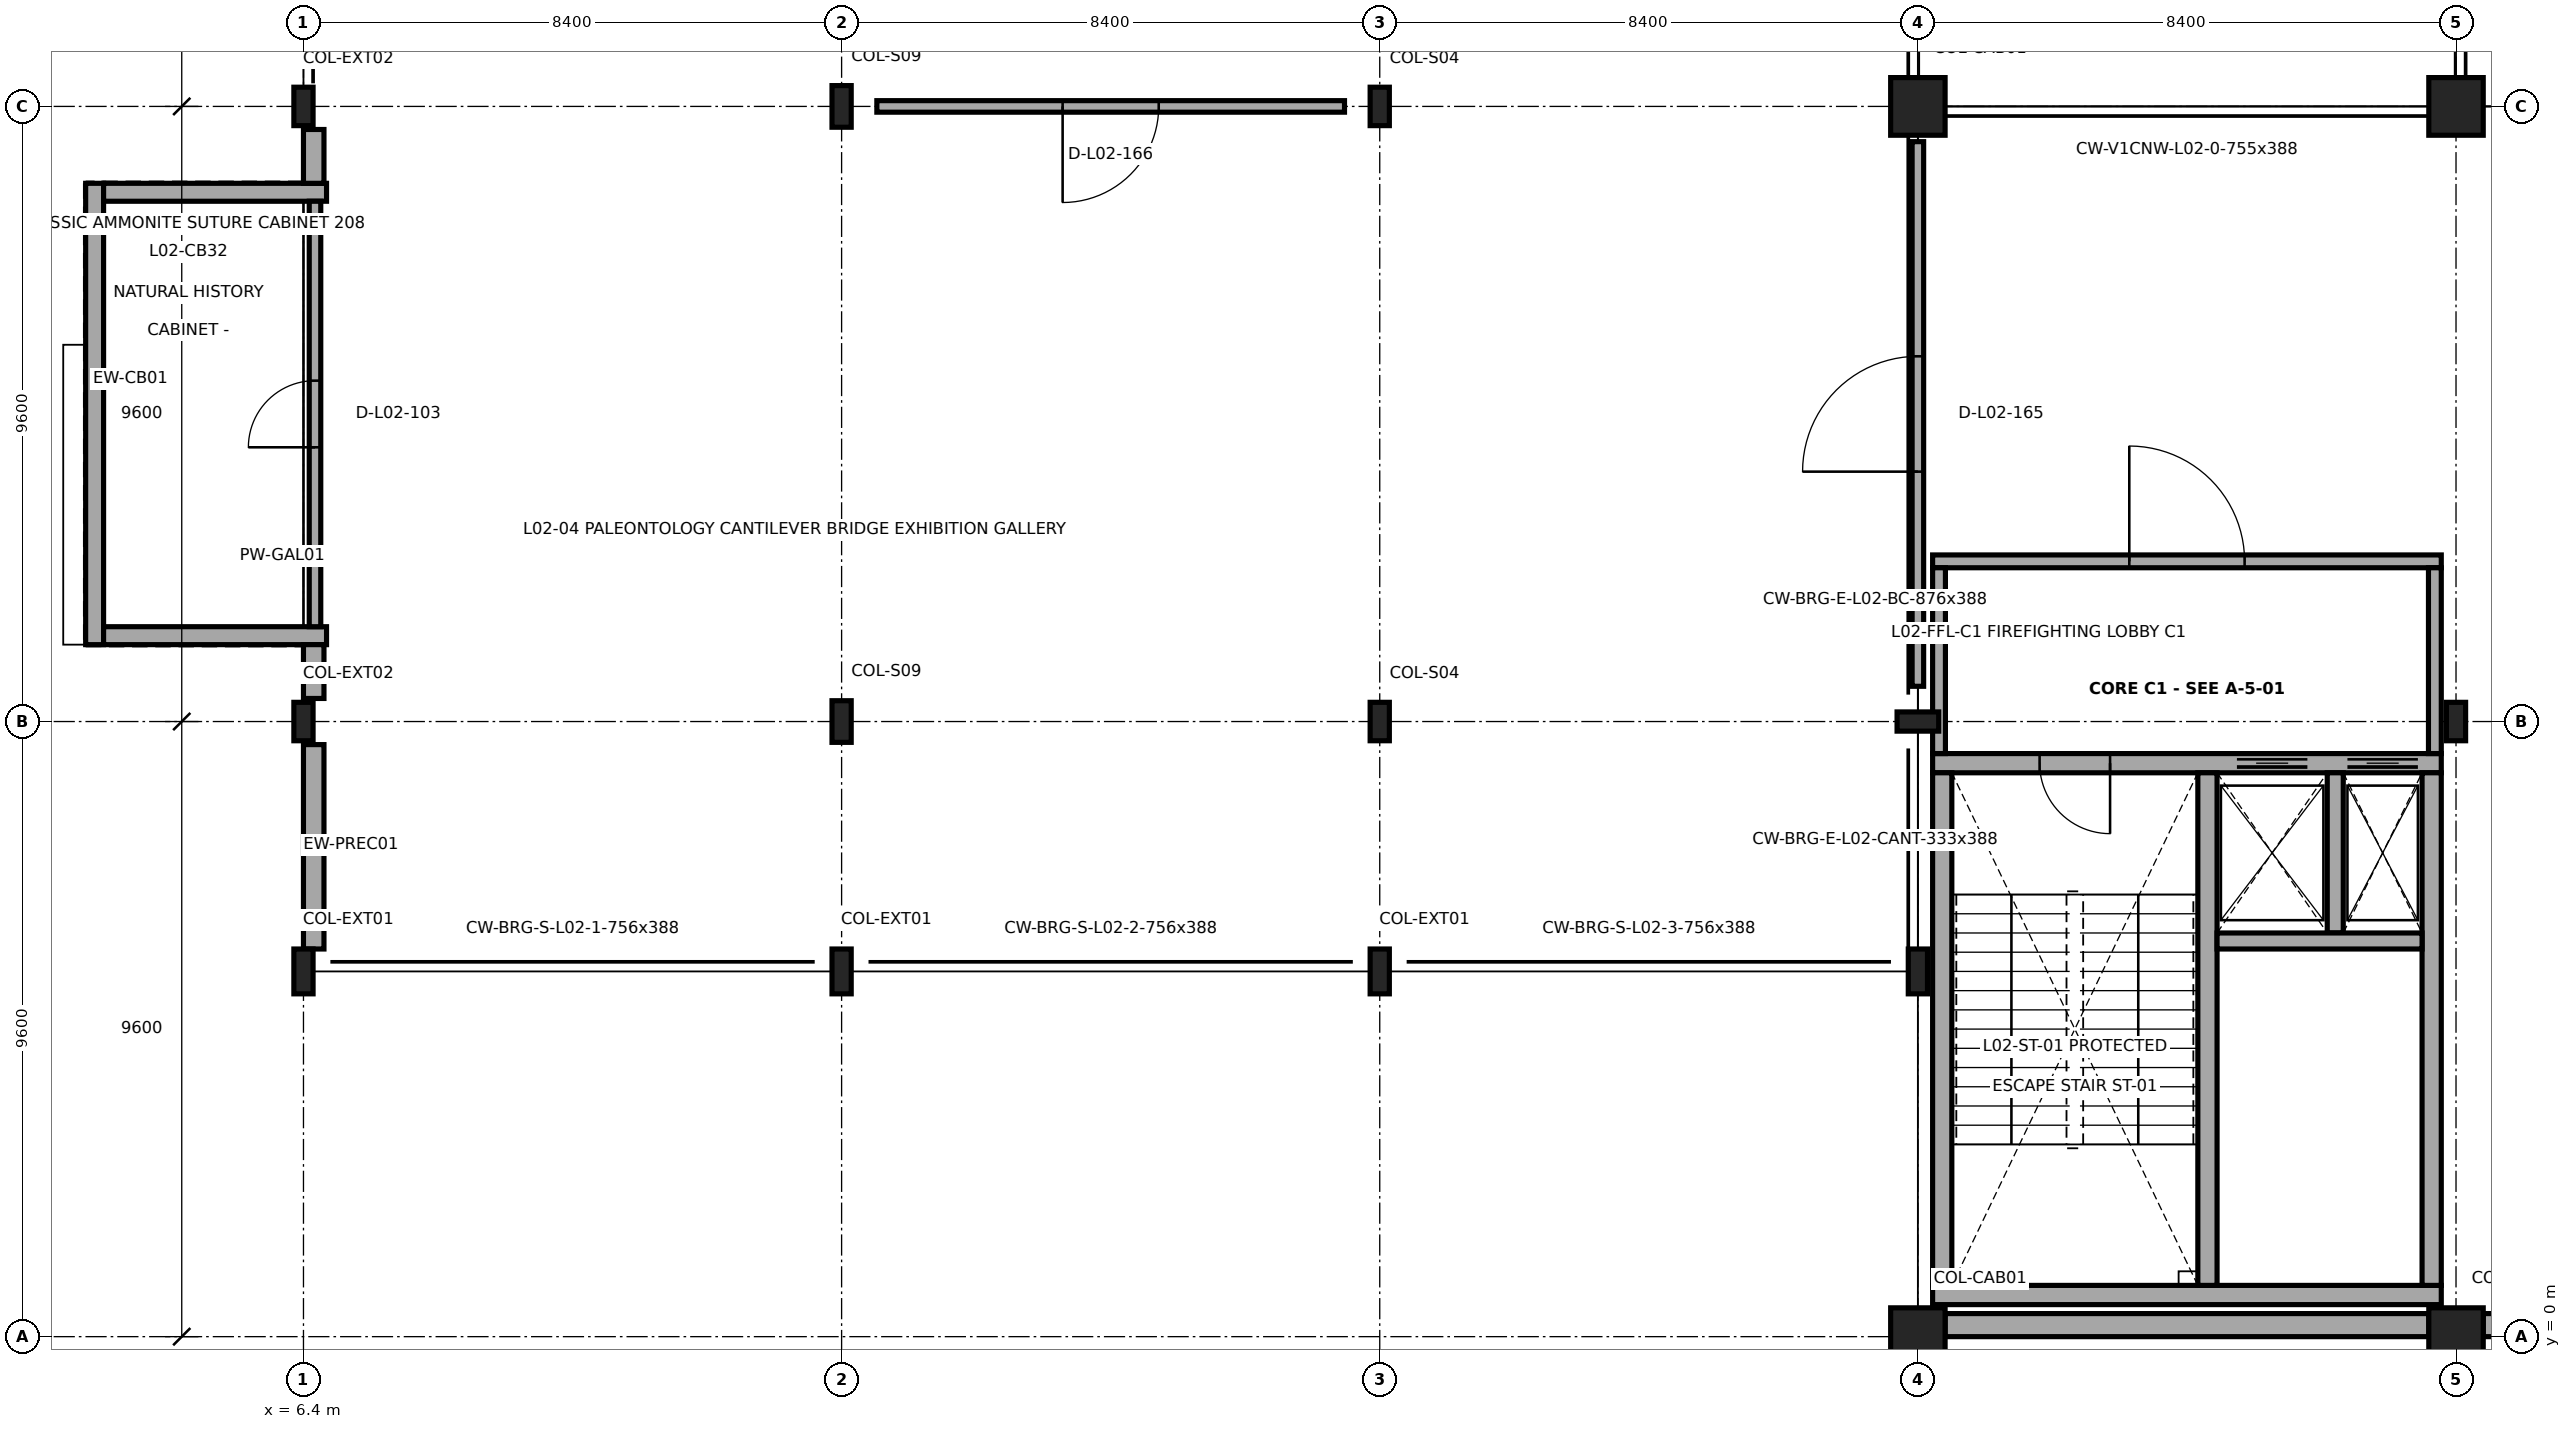
"""IFC4 building model, lengths in metres.
Left out: names, types, materials, properties, quantities, classifications, styles, units other than length and angle.
Written with IfcOpenShell. Run it as: python <this file> out.ifc"""

import sys

from ifc_helpers import new_model, si_unit, direction, frame, frame_2d, origin, origin_2d, place, context, subcontext, project, spatial, rectangle, i_section, extrude, element, fill, save


model = new_model("IFC4")
c1 = context("Model", 3, precision=1e-05, world=origin(), true_north=direction((0.0, 1.0)))
c2 = subcontext(c1, "Body", "Model", "MODEL_VIEW")
j1 = project(units=[si_unit("LENGTHUNIT", "METRE"), si_unit("PLANEANGLEUNIT", "RADIAN")], contexts=[c1])
p1 = place(None, origin())
s1 = spatial("IfcSite", under=j1, at=p1, CompositionType="ELEMENT")
p2 = place(p1, origin())
s2 = spatial("IfcBuilding", under=s1, at=p2, CompositionType="ELEMENT")
p3 = place(p2, frame((0.0, 0.0, 12.9)))
s3 = spatial("IfcBuildingStorey", under=s2, at=p3, CompositionType="ELEMENT", Elevation=12.9)
for number, where, z_axis, x_axis in (
    (1, (6.4, 9.6, 0.0), (0.0, 0.0, 1.0), (1.0, 0.0, 0.0)),
    (2, (6.4, 19.2, 0.0), (0.0, 0.0, 1.0), (1.0, 0.0, 0.0)),
):
    element("IfcColumn", number, at=place(p3, frame(where, z_axis=z_axis, x_axis=x_axis)), inside=s3, PredefinedType="COLUMN", context=c2, shape_type="SweptSolid", body=[
        extrude(i_section(OverallWidth=0.3, OverallDepth=0.6, WebThickness=0.015, FlangeThickness=0.03, FilletRadius=0.027, at=origin_2d()), origin(), (0.0, 0.0, 1.0), 4.5),
    ])
for number, where, z_axis, x_axis in (
    (3, (14.8, 9.6, 0.0), (0.0, 0.0, 1.0), (1.0, 0.0, 0.0)),
    (4, (14.8, 19.2, 0.0), (0.0, 0.0, 1.0), (1.0, 0.0, 0.0)),
):
    element("IfcColumn", number, at=place(p3, frame(where, z_axis=z_axis, x_axis=x_axis)), inside=s3, PredefinedType="COLUMN", context=c2, shape_type="SweptSolid", body=[
        extrude(i_section(OverallWidth=0.3, OverallDepth=0.65, WebThickness=0.016, FlangeThickness=0.031, FilletRadius=0.027, at=origin_2d()), origin(), (0.0, 0.0, 1.0), 4.5),
    ])
for number, where, z_axis, x_axis in (
    (5, (23.2, 9.6, 0.0), (0.0, 0.0, 1.0), (1.0, 0.0, 0.0)),
    (6, (23.2, 19.2, 0.0), (0.0, 0.0, 1.0), (1.0, 0.0, 0.0)),
):
    element("IfcColumn", number, at=place(p3, frame(where, z_axis=z_axis, x_axis=x_axis)), inside=s3, PredefinedType="COLUMN", context=c2, shape_type="SweptSolid", body=[
        extrude(i_section(OverallWidth=0.3, OverallDepth=0.6, WebThickness=0.015, FlangeThickness=0.03, FilletRadius=0.027, at=origin_2d()), origin(), (0.0, 0.0, 1.0), 4.5),
    ])
p4 = place(p3, frame((31.6, 0.0, 0.0), z_axis=(0.0, 0.0, 1.0), x_axis=(1.0, 0.0, 0.0)))
e7 = element("IfcColumn", 7, at=p4, inside=s3, PredefinedType="COLUMN", context=c2, shape_type="SweptSolid", body=[
    extrude(rectangle(XDim=0.85, YDim=0.9, at=origin_2d()), origin(), (0.0, 0.0, 1.0), 4.5),
])
p5 = place(p3, frame((31.6, 9.6, 0.0), z_axis=(0.0, 0.0, 1.0), x_axis=(0.0, 1.0, 0.0)))
e8 = element("IfcColumn", 8, at=p5, inside=s3, PredefinedType="COLUMN", context=c2, shape_type="SweptSolid", body=[
    extrude(i_section(OverallWidth=0.3, OverallDepth=0.65, WebThickness=0.016, FlangeThickness=0.031, FilletRadius=0.027, at=origin_2d()), origin(), (0.0, 0.0, 1.0), 4.5),
])
for number, where, z_axis, x_axis in (
    (9, (31.6, 19.2, 0.0), (0.0, 0.0, 1.0), (1.0, 0.0, 0.0)),
    (10, (40.0, 0.0, 0.0), (0.0, 0.0, 1.0), (1.0, 0.0, 0.0)),
):
    element("IfcColumn", number, at=place(p3, frame(where, z_axis=z_axis, x_axis=x_axis)), inside=s3, PredefinedType="COLUMN", context=c2, shape_type="SweptSolid", body=[
        extrude(rectangle(XDim=0.85, YDim=0.9, at=origin_2d()), origin(), (0.0, 0.0, 1.0), 4.5),
    ])
p6 = place(p3, frame((40.0, 9.6, 0.0), z_axis=(0.0, 0.0, 1.0), x_axis=(1.0, 0.0, 0.0)))
e11 = element("IfcColumn", 11, at=p6, inside=s3, PredefinedType="COLUMN", context=c2, shape_type="SweptSolid", body=[
    extrude(i_section(OverallWidth=0.3, OverallDepth=0.6, WebThickness=0.015, FlangeThickness=0.03, FilletRadius=0.027, at=origin_2d()), origin(), (0.0, 0.0, 1.0), 4.5),
])
p7 = place(p3, frame((40.0, 19.2, 0.0), z_axis=(0.0, 0.0, 1.0), x_axis=(1.0, 0.0, 0.0)))
e12 = element("IfcColumn", 12, at=p7, inside=s3, PredefinedType="COLUMN", context=c2, shape_type="SweptSolid", body=[
    extrude(rectangle(XDim=0.85, YDim=0.9, at=origin_2d()), origin(), (0.0, 0.0, 1.0), 4.5),
])
for number, where, z_axis, x_axis in (
    (13, (6.4, 5.7, 0.0), (0.0, 0.0, 1.0), (1.0, 0.0, 0.0)),
    (14, (14.8, 5.7, 0.0), (0.0, 0.0, 1.0), (1.0, 0.0, 0.0)),
    (15, (23.2, 5.7, 0.0), (0.0, 0.0, 1.0), (1.0, 0.0, 0.0)),
    (16, (31.6, 5.7, 0.0), (0.0, 0.0, 1.0), (1.0, 0.0, 0.0)),
):
    element("IfcColumn", number, at=place(p3, frame(where, z_axis=z_axis, x_axis=x_axis)), inside=s3, PredefinedType="COLUMN", context=c2, shape_type="SweptSolid", body=[
        extrude(i_section(OverallWidth=0.3, OverallDepth=0.7, WebThickness=0.017, FlangeThickness=0.032, FilletRadius=0.027, at=origin_2d()), origin(), (0.0, 0.0, 1.0), 4.5),
    ])
p8 = place(p3, frame((3.14, 18.0, 0.0), z_axis=(0.0, 0.0, 1.0), x_axis=(0.0, -1.0, 0.0)))
e17 = element("IfcWall", 17, at=p8, inside=s3, PredefinedType="SOLIDWALL", context=c2, shape_type="SweptSolid", body=[
    extrude(rectangle(XDim=7.2, YDim=0.28, at=frame_2d((3.6, 0.0))), origin(), (0.0, 0.0, 1.0), 2.62),
])
for number, where, z_axis, x_axis in (
    (18, (3.28, 10.94, 0.0), (0.0, 0.0, 1.0), (1.0, 0.0, 0.0)),
    (19, (6.76, 17.86, 0.0), (0.0, 0.0, 1.0), (-1.0, 0.0, 0.0)),
):
    element("IfcWall", number, at=place(p3, frame(where, z_axis=z_axis, x_axis=x_axis)), inside=s3, PredefinedType="SOLIDWALL", context=c2, shape_type="SweptSolid", body=[
        extrude(rectangle(XDim=3.48, YDim=0.28, at=frame_2d((1.74, 0.0))), origin(), (0.0, 0.0, 1.0), 2.62),
    ])
p9 = place(p3, frame((32.025, 0.18, 0.0), z_axis=(0.0, 0.0, 1.0), x_axis=(1.0, 0.0, 0.0)))
e20 = element("IfcWall", 20, at=p9, inside=s3, PredefinedType="SOLIDWALL", context=c2, shape_type="SweptSolid", body=[
    extrude(rectangle(XDim=7.55, YDim=0.36, at=frame_2d((3.775, 0.0))), origin(), (0.0, 0.0, 1.0), 3.335),
])
p10 = place(p3, frame((40.425, 0.18, 0.0), z_axis=(0.0, 0.0, 1.0), x_axis=(1.0, 0.0, 0.0)))
e21 = element("IfcWall", 21, at=p10, inside=s3, PredefinedType="SOLIDWALL", context=c2, shape_type="SweptSolid", body=[
    extrude(rectangle(XDim=0.575, YDim=0.36, at=frame_2d((0.288, 0.0))), origin(), (0.0, 0.0, 1.0), 3.335),
])
p11 = place(p3, frame((6.56, 9.24, 0.0), z_axis=(0.0, 0.0, 1.0), x_axis=(0.0, -1.0, 0.0)))
e22 = element("IfcWall", 22, at=p11, inside=s3, PredefinedType="SOLIDWALL", context=c2, shape_type="SweptSolid", body=[
    extrude(rectangle(XDim=3.19, YDim=0.32, at=frame_2d((1.595, 0.0))), origin(), (0.0, 0.0, 1.0), 3.532),
])
for number, where, z_axis, x_axis in (
    (23, (6.56, 10.8, 0.0), (0.0, 0.0, 1.0), (0.0, -1.0, 0.0)),
    (24, (6.56, 18.84, 0.0), (0.0, 0.0, 1.0), (0.0, -1.0, 0.0)),
):
    element("IfcWall", number, at=place(p3, frame(where, z_axis=z_axis, x_axis=x_axis)), inside=s3, PredefinedType="SOLIDWALL", context=c2, shape_type="SweptSolid", body=[
        extrude(rectangle(XDim=0.84, YDim=0.32, at=frame_2d((0.42, 0.0))), origin(), (0.0, 0.0, 1.0), 2.622),
    ])
p12 = place(p3, frame((31.83, 0.65, 0.0), z_axis=(0.0, 0.0, 1.0), x_axis=(1.0, 0.0, 0.0)))
e25 = element("IfcWall", 25, at=p12, inside=s3, PredefinedType="SHEAR", context=c2, shape_type="SweptSolid", body=[
    extrude(rectangle(XDim=7.94, YDim=0.3, at=frame_2d((3.97, 0.0))), origin(), (0.0, 0.0, 1.0), 4.25),
])
p13 = place(p3, frame((39.77, 8.95, 0.0), z_axis=(0.0, 0.0, 1.0), x_axis=(-1.0, 0.0, 0.0)))
e26 = element("IfcWall", 26, at=p13, inside=s3, PredefinedType="SHEAR", context=c2, shape_type="SweptSolid", body=[
    extrude(rectangle(XDim=7.94, YDim=0.3, at=frame_2d((3.97, 0.0))), origin(), (0.0, 0.0, 1.0), 4.25),
])
p14 = place(p13, frame((5.17, 0.0, 0.0)))
e27 = element("IfcOpeningElement", 27, at=p14, cuts=e26, PredefinedType="OPENING", context=c2, shape_type="SweptSolid", body=[
    extrude(rectangle(XDim=1.1, YDim=2.2, at=frame_2d((0.55, 1.1))), frame((0.0, 0.16, 0.0), z_axis=(0.0, -1.0, 0.0), x_axis=(1.0, 0.0, 0.0)), (0.0, 0.0, 1.0), 0.32),
])
p15 = place(p13, frame((2.09, 0.0, 0.0)))
e28 = element("IfcOpeningElement", 28, at=p15, cuts=e26, PredefinedType="OPENING", context=c2, shape_type="SweptSolid", body=[
    extrude(rectangle(XDim=1.1, YDim=2.1, at=frame_2d((0.55, 1.05))), frame((0.0, 0.16, 0.0), z_axis=(0.0, -1.0, 0.0), x_axis=(1.0, 0.0, 0.0)), (0.0, 0.0, 1.0), 0.32),
])
p16 = place(p13, frame((0.365, 0.0, 0.0)))
e29 = element("IfcOpeningElement", 29, at=p16, cuts=e26, PredefinedType="OPENING", context=c2, shape_type="SweptSolid", body=[
    extrude(rectangle(XDim=1.1, YDim=2.1, at=frame_2d((0.55, 1.05))), frame((0.0, 0.16, 0.0), z_axis=(0.0, -1.0, 0.0), x_axis=(1.0, 0.0, 0.0)), (0.0, 0.0, 1.0), 0.32),
])
for number, where, z_axis, x_axis in (
    (30, (31.98, 8.8, 0.0), (0.0, 0.0, 1.0), (0.0, -1.0, 0.0)),
    (31, (39.62, 0.8, 0.0), (0.0, 0.0, 1.0), (0.0, 1.0, 0.0)),
    (32, (36.12, 0.8, 0.0), (0.0, 0.0, 1.0), (0.0, 1.0, 0.0)),
):
    element("IfcWall", number, at=place(p3, frame(where, z_axis=z_axis, x_axis=x_axis)), inside=s3, PredefinedType="SHEAR", context=c2, shape_type="SweptSolid", body=[
        extrude(rectangle(XDim=8.0, YDim=0.3, at=frame_2d((4.0, 0.0))), origin(), (0.0, 0.0, 1.0), 4.25),
    ])
p17 = place(p3, frame((38.115, 6.3, 0.0), z_axis=(0.0, 0.0, 1.0), x_axis=(0.0, 1.0, 0.0)))
e33 = element("IfcWall", 33, at=p17, inside=s3, PredefinedType="SHEAR", context=c2, shape_type="SweptSolid", body=[
    extrude(rectangle(XDim=2.5, YDim=0.25, at=frame_2d((1.25, 0.0))), origin(), (0.0, 0.0, 1.0), 4.25),
])
p18 = place(p3, frame((36.27, 6.175, 0.0), z_axis=(0.0, 0.0, 1.0), x_axis=(1.0, 0.0, 0.0)))
e34 = element("IfcWall", 34, at=p18, inside=s3, PredefinedType="SHEAR", context=c2, shape_type="SweptSolid", body=[
    extrude(rectangle(XDim=3.2, YDim=0.25, at=frame_2d((1.6, 0.0))), origin(), (0.0, 0.0, 1.0), 4.25),
])
p19 = place(p3, frame((31.83, 12.1, 0.0), z_axis=(0.0, 0.0, 1.0), x_axis=(1.0, 0.0, 0.0)))
e35 = element("IfcWall", 35, at=p19, inside=s3, PredefinedType="SOLIDWALL", context=c2, shape_type="SweptSolid", body=[
    extrude(rectangle(XDim=7.94, YDim=0.2, at=frame_2d((3.97, 0.0))), origin(), (0.0, 0.0, 1.0), 3.532),
])
p20 = place(p19, frame((3.07, 0.0, 0.0)))
e36 = element("IfcOpeningElement", 36, at=p20, cuts=e35, PredefinedType="OPENING", context=c2, shape_type="SweptSolid", body=[
    extrude(rectangle(XDim=1.8, YDim=2.2, at=frame_2d((0.9, 1.1))), frame((0.0, 0.11, 0.0), z_axis=(0.0, -1.0, 0.0), x_axis=(1.0, 0.0, 0.0)), (0.0, 0.0, 1.0), 0.22),
])
for number, where, z_axis, x_axis in (
    (37, (31.93, 9.1, 0.0), (0.0, 0.0, 1.0), (0.0, 1.0, 0.0)),
    (38, (39.67, 12.0, 0.0), (0.0, 0.0, 1.0), (0.0, -1.0, 0.0)),
):
    element("IfcWall", number, at=place(p3, frame(where, z_axis=z_axis, x_axis=x_axis)), inside=s3, PredefinedType="SOLIDWALL", context=c2, shape_type="SweptSolid", body=[
        extrude(rectangle(XDim=2.9, YDim=0.2, at=frame_2d((1.45, 0.0))), origin(), (0.0, 0.0, 1.0), 3.642),
    ])
p21 = place(p3, frame((6.58, 11.08, 0.0), z_axis=(0.0, 0.0, 1.0), x_axis=(0.0, 1.0, 0.0)))
e39 = element("IfcWall", 39, at=p21, inside=s3, PredefinedType="PARTITIONING", context=c2, shape_type="SweptSolid", body=[
    extrude(rectangle(XDim=6.64, YDim=0.18, at=frame_2d((3.32, 0.0))), origin(), (0.0, 0.0, 1.0), 2.62),
])
p22 = place(p21, frame((2.8, 0.0, 0.0)))
e40 = element("IfcOpeningElement", 40, at=p22, cuts=e39, PredefinedType="OPENING", context=c2, shape_type="SweptSolid", body=[
    extrude(rectangle(XDim=1.04, YDim=2.18, at=frame_2d((0.52, 1.09))), frame((0.0, 0.1, 0.0), z_axis=(0.0, -1.0, 0.0), x_axis=(1.0, 0.0, 0.0)), (0.0, 0.0, 1.0), 0.2),
])
p23 = place(p3, frame((31.6, 10.15, 0.0), z_axis=(0.0, 0.0, 1.0), x_axis=(0.0, 1.0, 0.0)))
e41 = element("IfcWall", 41, at=p23, inside=s3, PredefinedType="PARTITIONING", context=c2, shape_type="SweptSolid", body=[
    extrude(rectangle(XDim=8.5, YDim=0.18, at=frame_2d((4.25, 0.0))), origin(), (0.0, 0.0, 1.0), 3.532),
])
p24 = place(p23, frame((3.35, 0.0, 0.0)))
e42 = element("IfcOpeningElement", 42, at=p24, cuts=e41, PredefinedType="OPENING", context=c2, shape_type="SweptSolid", body=[
    extrude(rectangle(XDim=1.8, YDim=2.2, at=frame_2d((0.9, 1.1))), frame((0.0, 0.1, 0.0), z_axis=(0.0, -1.0, 0.0), x_axis=(1.0, 0.0, 0.0)), (0.0, 0.0, 1.0), 0.2),
])
p25 = place(p3, frame((15.35, 19.2, 0.0), z_axis=(0.0, 0.0, 1.0), x_axis=(1.0, 0.0, 0.0)))
e43 = element("IfcWall", 43, at=p25, inside=s3, PredefinedType="PARTITIONING", context=c2, shape_type="SweptSolid", body=[
    extrude(rectangle(XDim=7.3, YDim=0.18, at=frame_2d((3.65, 0.0))), origin(), (0.0, 0.0, 1.0), 3.642),
])
p26 = place(p25, frame((2.9, 0.0, 0.0)))
e44 = element("IfcOpeningElement", 44, at=p26, cuts=e43, PredefinedType="OPENING", context=c2, shape_type="SweptSolid", body=[
    extrude(rectangle(XDim=1.5, YDim=2.3, at=frame_2d((0.75, 1.15))), frame((0.0, 0.1, 0.0), z_axis=(0.0, -1.0, 0.0), x_axis=(1.0, 0.0, 0.0)), (0.0, 0.0, 1.0), 0.2),
])
p27 = place(p14, origin())
e45 = element("IfcDoor", 45, at=p27, inside=s3, OperationType="SINGLE_SWING_LEFT", PredefinedType="DOOR", context=c2, shape_type="SweptSolid", body=[
    extrude(rectangle(XDim=1.1, YDim=2.2, at=frame_2d((0.55, 1.1))), frame((0.0, 0.025, 0.0), z_axis=(0.0, -1.0, 0.0), x_axis=(1.0, 0.0, 0.0)), (0.0, 0.0, 1.0), 0.05),
])
fill(e27, e45)
p28 = place(p15, origin())
e46 = element("IfcDoor", 46, at=p28, inside=s3, OperationType="SLIDING_TO_LEFT", PredefinedType="DOOR", context=c2, shape_type="SweptSolid", body=[
    extrude(rectangle(XDim=1.1, YDim=2.1, at=frame_2d((0.55, 1.05))), frame((0.0, 0.025, 0.0), z_axis=(0.0, -1.0, 0.0), x_axis=(1.0, 0.0, 0.0)), (0.0, 0.0, 1.0), 0.05),
])
fill(e28, e46)
p29 = place(p16, origin())
e47 = element("IfcDoor", 47, at=p29, inside=s3, OperationType="SLIDING_TO_LEFT", PredefinedType="DOOR", context=c2, shape_type="SweptSolid", body=[
    extrude(rectangle(XDim=1.1, YDim=2.1, at=frame_2d((0.55, 1.05))), frame((0.0, 0.025, 0.0), z_axis=(0.0, -1.0, 0.0), x_axis=(1.0, 0.0, 0.0)), (0.0, 0.0, 1.0), 0.05),
])
fill(e29, e47)
p30 = place(p20, origin())
e48 = element("IfcDoor", 48, at=p30, inside=s3, OperationType="DOUBLE_DOOR_SINGLE_SWING", PredefinedType="DOOR", context=c2, shape_type="SweptSolid", body=[
    extrude(rectangle(XDim=1.8, YDim=2.2, at=frame_2d((0.9, 1.1))), frame((0.0, 0.025, 0.0), z_axis=(0.0, -1.0, 0.0), x_axis=(1.0, 0.0, 0.0)), (0.0, 0.0, 1.0), 0.05),
])
fill(e36, e48)
p31 = place(p22, origin())
e49 = element("IfcDoor", 49, at=p31, inside=s3, OperationType="SINGLE_SWING_LEFT", PredefinedType="DOOR", context=c2, shape_type="SweptSolid", body=[
    extrude(rectangle(XDim=1.04, YDim=2.18, at=frame_2d((0.52, 1.09))), frame((0.0, 0.025, 0.0), z_axis=(0.0, -1.0, 0.0), x_axis=(1.0, 0.0, 0.0)), (0.0, 0.0, 1.0), 0.05),
])
fill(e40, e49)
p32 = place(p24, origin())
e50 = element("IfcDoor", 50, at=p32, inside=s3, OperationType="DOUBLE_DOOR_SINGLE_SWING", PredefinedType="DOOR", context=c2, shape_type="SweptSolid", body=[
    extrude(rectangle(XDim=1.8, YDim=2.2, at=frame_2d((0.9, 1.1))), frame((0.0, 0.025, 0.0), z_axis=(0.0, -1.0, 0.0), x_axis=(1.0, 0.0, 0.0)), (0.0, 0.0, 1.0), 0.05),
])
fill(e42, e50)
p33 = place(p26, origin())
e51 = element("IfcDoor", 51, at=p33, inside=s3, OperationType="SINGLE_SWING_RIGHT", PredefinedType="DOOR", context=c2, shape_type="SweptSolid", body=[
    extrude(rectangle(XDim=1.5, YDim=2.3, at=frame_2d((0.75, 1.15))), frame((0.0, 0.025, 0.0), z_axis=(0.0, -1.0, 0.0), x_axis=(1.0, 0.0, 0.0)), (0.0, 0.0, 1.0), 0.05),
])
fill(e44, e51)
save(model, sys.argv[1])
